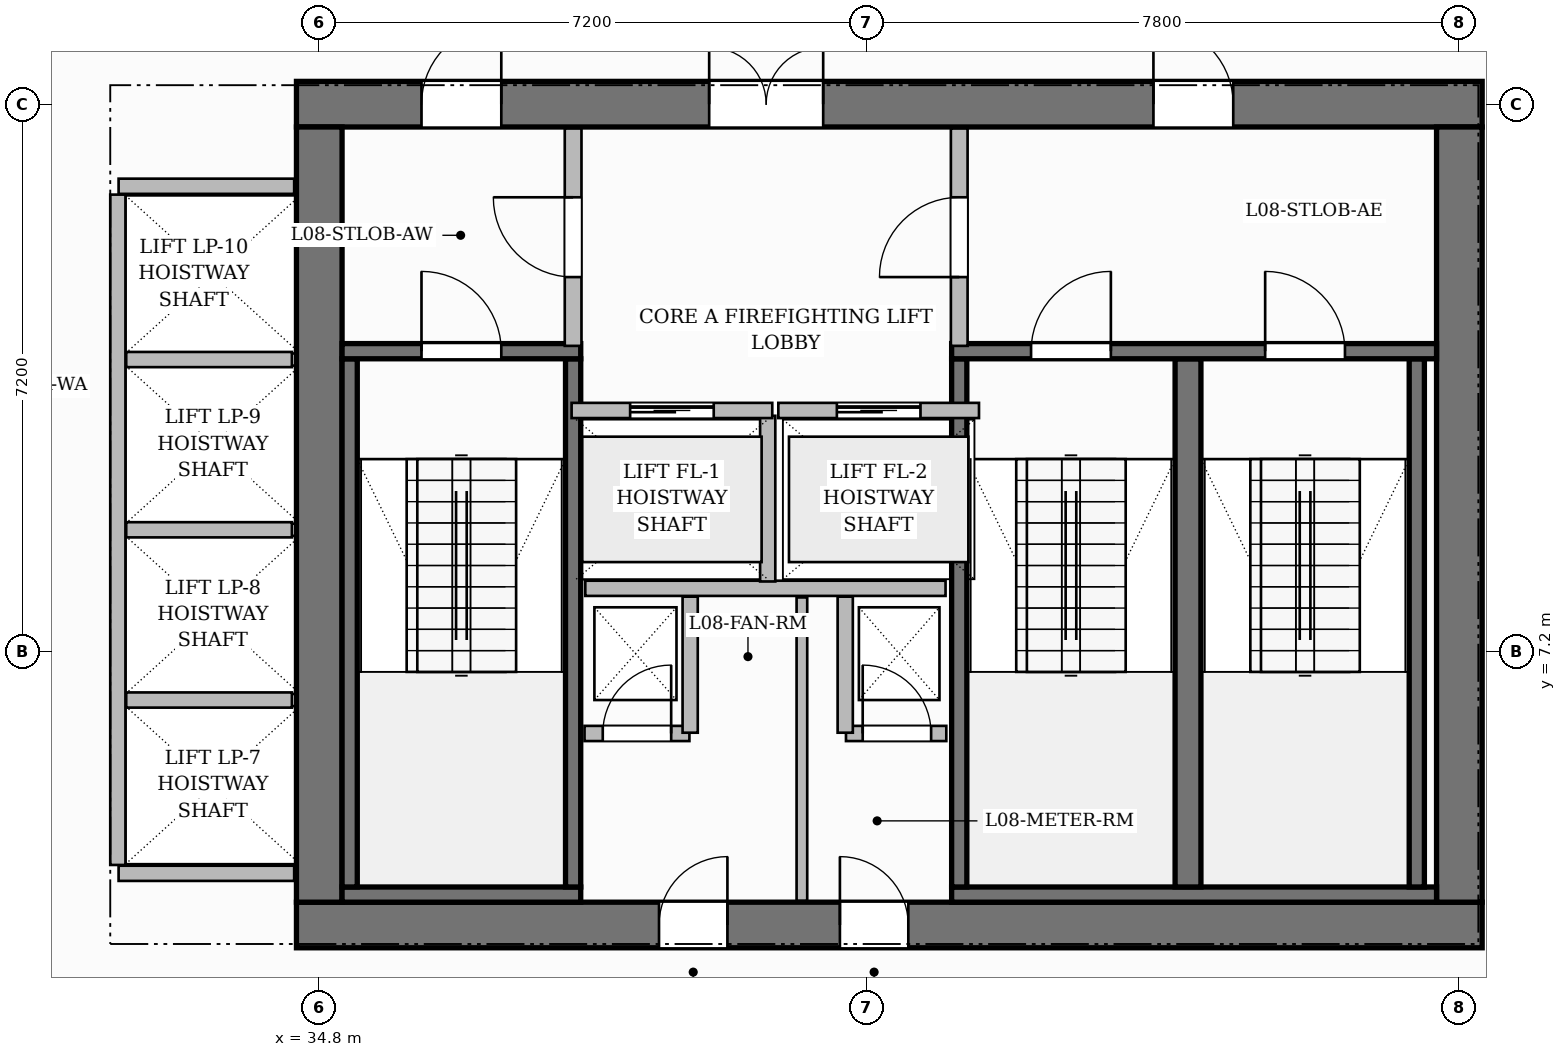
"""IFC4 building model, lengths in metres.
Left out: names, types, materials, properties, quantities, classifications, styles, units other than length and angle.
Written with IfcOpenShell. Run it as: python <this file> out.ifc"""

import sys

from ifc_helpers import new_model, si_unit, direction, frame, frame_2d, origin, place, context, subcontext, project, spatial, rectangle, extrude, source, transform, mapped, element, fill, save


model = new_model("IFC4")
c1 = context("Model", 3, precision=1e-05, world=origin(), true_north=direction((0.0, 1.0)))
c2 = subcontext(c1, "Body", "Model", "MODEL_VIEW")
j1 = project(units=[si_unit("LENGTHUNIT", "METRE"), si_unit("PLANEANGLEUNIT", "RADIAN")], contexts=[c1])
p1 = place(None, origin())
s1 = spatial("IfcSite", under=j1, at=p1, CompositionType="ELEMENT")
p2 = place(p1, origin())
s2 = spatial("IfcBuilding", under=s1, at=p2, CompositionType="ELEMENT")
p3 = place(p2, frame((0.0, 0.0, 39.8)))
s3 = spatial("IfcBuildingStorey", under=s2, at=p3, CompositionType="ELEMENT", Elevation=39.8)
p4 = place(p3, frame((34.5, 3.6, 0.0), z_axis=(0.0, 0.0, 1.0), x_axis=(1.0, 0.0, 0.0)))
e1 = element("IfcWall", 1, at=p4, inside=s3, PredefinedType="SHEAR", context=c2, shape_type="SweptSolid", body=[
    extrude(rectangle(XDim=15.6, YDim=0.6, at=frame_2d((7.8, 0.0))), origin(), (0.0, 0.0, 1.0), 3.7),
])
p5 = place(p4, frame((4.77, 0.0, 0.0)))
e2 = element("IfcOpeningElement", 2, at=p5, cuts=e1, PredefinedType="OPENING", context=c2, shape_type="SweptSolid", body=[
    extrude(rectangle(XDim=0.9, YDim=2.1, at=frame_2d((0.45, 1.05))), frame((0.0, 0.31, 0.0), z_axis=(0.0, -1.0, 0.0), x_axis=(1.0, 0.0, 0.0)), (0.0, 0.0, 1.0), 0.62),
])
p6 = place(p4, frame((7.15, 0.0, 0.0)))
e3 = element("IfcOpeningElement", 3, at=p6, cuts=e1, PredefinedType="OPENING", context=c2, shape_type="SweptSolid", body=[
    extrude(rectangle(XDim=0.9, YDim=2.1, at=frame_2d((0.45, 1.05))), frame((0.0, 0.31, 0.0), z_axis=(0.0, -1.0, 0.0), x_axis=(1.0, 0.0, 0.0)), (0.0, 0.0, 1.0), 0.62),
])
p7 = place(p3, frame((34.5, 14.4, 0.0), z_axis=(0.0, 0.0, 1.0), x_axis=(1.0, 0.0, 0.0)))
e4 = element("IfcWall", 4, at=p7, inside=s3, PredefinedType="SHEAR", context=c2, shape_type="SweptSolid", body=[
    extrude(rectangle(XDim=15.6, YDim=0.6, at=frame_2d((7.8, 0.0))), origin(), (0.0, 0.0, 1.0), 3.7),
])
p8 = place(p7, frame((5.43, 0.0, 0.0)))
e5 = element("IfcOpeningElement", 5, at=p8, cuts=e4, PredefinedType="OPENING", context=c2, shape_type="SweptSolid", body=[
    extrude(rectangle(XDim=1.5, YDim=2.2, at=frame_2d((0.75, 1.1))), frame((0.0, 0.31, 0.0), z_axis=(0.0, -1.0, 0.0), x_axis=(1.0, 0.0, 0.0)), (0.0, 0.0, 1.0), 0.62),
])
p9 = place(p7, frame((1.645, 0.0, 0.0)))
e6 = element("IfcOpeningElement", 6, at=p9, cuts=e4, PredefinedType="OPENING", context=c2, shape_type="SweptSolid", body=[
    extrude(rectangle(XDim=1.05, YDim=2.15, at=frame_2d((0.525, 1.075))), frame((0.0, 0.31, 0.0), z_axis=(0.0, -1.0, 0.0), x_axis=(1.0, 0.0, 0.0)), (0.0, 0.0, 1.0), 0.62),
])
p10 = place(p7, frame((11.275, 0.0, 0.0)))
e7 = element("IfcOpeningElement", 7, at=p10, cuts=e4, PredefinedType="OPENING", context=c2, shape_type="SweptSolid", body=[
    extrude(rectangle(XDim=1.05, YDim=2.15, at=frame_2d((0.525, 1.075))), frame((0.0, 0.31, 0.0), z_axis=(0.0, -1.0, 0.0), x_axis=(1.0, 0.0, 0.0)), (0.0, 0.0, 1.0), 0.62),
])
for number, where, z_axis, x_axis in (
    (8, (34.8, 3.9, 0.0), (0.0, 0.0, 1.0), (0.0, 1.0, 0.0)),
    (9, (49.8, 3.9, 0.0), (0.0, 0.0, 1.0), (0.0, 1.0, 0.0)),
):
    element("IfcWall", number, at=place(p3, frame(where, z_axis=z_axis, x_axis=x_axis)), inside=s3, PredefinedType="SHEAR", context=c2, shape_type="SweptSolid", body=[
        extrude(rectangle(XDim=10.2, YDim=0.6, at=frame_2d((5.1, 0.0))), origin(), (0.0, 0.0, 1.0), 3.7),
    ])
p11 = place(p3, frame((35.1, 4.0, 0.0), z_axis=(0.0, 0.0, 1.0), x_axis=(1.0, 0.0, 0.0)))
e10 = element("IfcWall", 10, at=p11, inside=s3, PredefinedType="SHEAR", context=c2, shape_type="SweptSolid", body=[
    extrude(rectangle(XDim=3.14, YDim=0.2, at=frame_2d((1.57, 0.0))), origin(), (0.0, 0.0, 1.0), 3.7),
])
for number, where, z_axis, x_axis in (
    (11, (35.2, 4.1, 0.0), (0.0, 0.0, 1.0), (0.0, 1.0, 0.0)),
    (12, (38.14, 4.1, 0.0), (0.0, 0.0, 1.0), (0.0, 1.0, 0.0)),
):
    element("IfcWall", number, at=place(p3, frame(where, z_axis=z_axis, x_axis=x_axis)), inside=s3, PredefinedType="SHEAR", context=c2, shape_type="SweptSolid", body=[
        extrude(rectangle(XDim=6.95, YDim=0.2, at=frame_2d((3.475, 0.0))), origin(), (0.0, 0.0, 1.0), 3.7),
    ])
p12 = place(p3, frame((35.1, 11.15, 0.0), z_axis=(0.0, 0.0, 1.0), x_axis=(1.0, 0.0, 0.0)))
e13 = element("IfcWall", 13, at=p12, inside=s3, PredefinedType="SHEAR", context=c2, shape_type="SweptSolid", body=[
    extrude(rectangle(XDim=3.14, YDim=0.2, at=frame_2d((1.57, 0.0))), origin(), (0.0, 0.0, 1.0), 3.7),
])
p13 = place(p12, frame((1.045, 0.0, 0.0)))
e14 = element("IfcOpeningElement", 14, at=p13, cuts=e13, PredefinedType="OPENING", context=c2, shape_type="SweptSolid", body=[
    extrude(rectangle(XDim=1.05, YDim=2.2, at=frame_2d((0.525, 1.1))), frame((0.0, 0.11, 0.0), z_axis=(0.0, -1.0, 0.0), x_axis=(1.0, 0.0, 0.0)), (0.0, 0.0, 1.0), 0.22),
])
p14 = place(p3, frame((43.12, 4.0, 0.0), z_axis=(0.0, 0.0, 1.0), x_axis=(1.0, 0.0, 0.0)))
e15 = element("IfcWall", 15, at=p14, inside=s3, PredefinedType="SHEAR", context=c2, shape_type="SweptSolid", body=[
    extrude(rectangle(XDim=6.38, YDim=0.2, at=frame_2d((3.19, 0.0))), origin(), (0.0, 0.0, 1.0), 3.7),
])
p15 = place(p3, frame((43.22, 4.1, 0.0), z_axis=(0.0, 0.0, 1.0), x_axis=(0.0, 1.0, 0.0)))
e16 = element("IfcWall", 16, at=p15, inside=s3, PredefinedType="SHEAR", context=c2, shape_type="SweptSolid", body=[
    extrude(rectangle(XDim=6.95, YDim=0.2, at=frame_2d((3.475, 0.0))), origin(), (0.0, 0.0, 1.0), 3.7),
])
p16 = place(p3, frame((46.23, 4.1, 0.0), z_axis=(0.0, 0.0, 1.0), x_axis=(0.0, 1.0, 0.0)))
e17 = element("IfcWall", 17, at=p16, inside=s3, PredefinedType="SHEAR", context=c2, shape_type="SweptSolid", body=[
    extrude(rectangle(XDim=6.95, YDim=0.34, at=frame_2d((3.475, 0.0))), origin(), (0.0, 0.0, 1.0), 3.7),
])
p17 = place(p3, frame((49.24, 4.1, 0.0), z_axis=(0.0, 0.0, 1.0), x_axis=(0.0, 1.0, 0.0)))
e18 = element("IfcWall", 18, at=p17, inside=s3, PredefinedType="SHEAR", context=c2, shape_type="SweptSolid", body=[
    extrude(rectangle(XDim=6.95, YDim=0.2, at=frame_2d((3.475, 0.0))), origin(), (0.0, 0.0, 1.0), 3.7),
])
p18 = place(p3, frame((43.12, 11.15, 0.0), z_axis=(0.0, 0.0, 1.0), x_axis=(1.0, 0.0, 0.0)))
e19 = element("IfcWall", 19, at=p18, inside=s3, PredefinedType="SHEAR", context=c2, shape_type="SweptSolid", body=[
    extrude(rectangle(XDim=6.38, YDim=0.2, at=frame_2d((3.19, 0.0))), origin(), (0.0, 0.0, 1.0), 3.7),
])
p19 = place(p18, frame((1.045, 0.0, 0.0)))
e20 = element("IfcOpeningElement", 20, at=p19, cuts=e19, PredefinedType="OPENING", context=c2, shape_type="SweptSolid", body=[
    extrude(rectangle(XDim=1.05, YDim=2.2, at=frame_2d((0.525, 1.1))), frame((0.0, 0.11, 0.0), z_axis=(0.0, -1.0, 0.0), x_axis=(1.0, 0.0, 0.0)), (0.0, 0.0, 1.0), 0.22),
])
p20 = place(p18, frame((4.125, 0.0, 0.0)))
e21 = element("IfcOpeningElement", 21, at=p20, cuts=e19, PredefinedType="OPENING", context=c2, shape_type="SweptSolid", body=[
    extrude(rectangle(XDim=1.05, YDim=2.2, at=frame_2d((0.525, 1.1))), frame((0.0, 0.11, 0.0), z_axis=(0.0, -1.0, 0.0), x_axis=(1.0, 0.0, 0.0)), (0.0, 0.0, 1.0), 0.22),
])
p21 = place(p3, frame((38.3, 8.03, 0.0), z_axis=(0.0, 0.0, 1.0), x_axis=(1.0, 0.0, 0.0)))
e22 = element("IfcWall", 22, at=p21, inside=s3, PredefinedType="PARTITIONING", context=c2, shape_type="SweptSolid", body=[
    extrude(rectangle(XDim=4.74, YDim=0.2, at=frame_2d((2.37, 0.0))), origin(), (0.0, 0.0, 1.0), 3.45),
])
p22 = place(p3, frame((40.7, 8.12, 0.0), z_axis=(0.0, 0.0, 1.0), x_axis=(0.0, 1.0, 0.0)))
e23 = element("IfcWall", 23, at=p22, inside=s3, PredefinedType="PARTITIONING", context=c2, shape_type="SweptSolid", body=[
    extrude(rectangle(XDim=2.18, YDim=0.2, at=frame_2d((1.09, 0.0))), origin(), (0.0, 0.0, 1.0), 3.45),
])
p23 = place(p3, frame((38.14, 11.22, 0.0), z_axis=(0.0, 0.0, 1.0), x_axis=(0.0, 1.0, 0.0)))
e24 = element("IfcWall", 24, at=p23, inside=s3, PredefinedType="PARTITIONING", context=c2, shape_type="SweptSolid", body=[
    extrude(rectangle(XDim=2.86, YDim=0.22, at=frame_2d((1.43, 0.0))), origin(), (0.0, 0.0, 1.0), 3.45),
])
p24 = place(p23, frame((0.905, 0.0, 0.0)))
e25 = element("IfcOpeningElement", 25, at=p24, cuts=e24, PredefinedType="OPENING", context=c2, shape_type="SweptSolid", body=[
    extrude(rectangle(XDim=1.05, YDim=2.15, at=frame_2d((0.525, 1.075))), frame((0.0, 0.12, 0.0), z_axis=(0.0, -1.0, 0.0), x_axis=(1.0, 0.0, 0.0)), (0.0, 0.0, 1.0), 0.24),
])
p25 = place(p3, frame((43.22, 11.22, 0.0), z_axis=(0.0, 0.0, 1.0), x_axis=(0.0, 1.0, 0.0)))
e26 = element("IfcWall", 26, at=p25, inside=s3, PredefinedType="PARTITIONING", context=c2, shape_type="SweptSolid", body=[
    extrude(rectangle(XDim=2.86, YDim=0.22, at=frame_2d((1.43, 0.0))), origin(), (0.0, 0.0, 1.0), 3.45),
])
p26 = place(p25, frame((0.905, 0.0, 0.0)))
e27 = element("IfcOpeningElement", 27, at=p26, cuts=e26, PredefinedType="OPENING", context=c2, shape_type="SweptSolid", body=[
    extrude(rectangle(XDim=1.05, YDim=2.15, at=frame_2d((0.525, 1.075))), frame((0.0, 0.12, 0.0), z_axis=(0.0, -1.0, 0.0), x_axis=(1.0, 0.0, 0.0)), (0.0, 0.0, 1.0), 0.24),
])
p27 = place(p3, frame((38.29, 6.12, 0.0), z_axis=(0.0, 0.0, 1.0), x_axis=(1.0, 0.0, 0.0)))
e28 = element("IfcWall", 28, at=p27, inside=s3, PredefinedType="PARTITIONING", context=c2, shape_type="SweptSolid", body=[
    extrude(rectangle(XDim=1.38, YDim=0.2, at=frame_2d((0.69, 0.0))), origin(), (0.0, 0.0, 1.0), 3.45),
])
p28 = place(p27, frame((0.24, 0.0, 0.0)))
e29 = element("IfcOpeningElement", 29, at=p28, cuts=e28, PredefinedType="OPENING", context=c2, shape_type="SweptSolid", body=[
    extrude(rectangle(XDim=0.9, YDim=2.1, at=frame_2d((0.45, 1.05))), frame((0.0, 0.11, 0.0), z_axis=(0.0, -1.0, 0.0), x_axis=(1.0, 0.0, 0.0)), (0.0, 0.0, 1.0), 0.22),
])
p29 = place(p3, frame((39.68, 6.13, 0.0), z_axis=(0.0, 0.0, 1.0), x_axis=(0.0, 1.0, 0.0)))
e30 = element("IfcWall", 30, at=p29, inside=s3, PredefinedType="PARTITIONING", context=c2, shape_type="SweptSolid", body=[
    extrude(rectangle(XDim=1.79, YDim=0.2, at=frame_2d((0.895, 0.0))), origin(), (0.0, 0.0, 1.0), 3.45),
])
p30 = place(p3, frame((41.73, 6.12, 0.0), z_axis=(0.0, 0.0, 1.0), x_axis=(1.0, 0.0, 0.0)))
e31 = element("IfcWall", 31, at=p30, inside=s3, PredefinedType="PARTITIONING", context=c2, shape_type="SweptSolid", body=[
    extrude(rectangle(XDim=1.32, YDim=0.2, at=frame_2d((0.66, 0.0))), origin(), (0.0, 0.0, 1.0), 3.45),
])
p31 = place(p30, frame((0.22, 0.0, 0.0)))
e32 = element("IfcOpeningElement", 32, at=p31, cuts=e31, PredefinedType="OPENING", context=c2, shape_type="SweptSolid", body=[
    extrude(rectangle(XDim=0.9, YDim=2.1, at=frame_2d((0.45, 1.05))), frame((0.0, 0.11, 0.0), z_axis=(0.0, -1.0, 0.0), x_axis=(1.0, 0.0, 0.0)), (0.0, 0.0, 1.0), 0.22),
])
p32 = place(p3, frame((41.72, 6.13, 0.0), z_axis=(0.0, 0.0, 1.0), x_axis=(0.0, 1.0, 0.0)))
e33 = element("IfcWall", 33, at=p32, inside=s3, PredefinedType="PARTITIONING", context=c2, shape_type="SweptSolid", body=[
    extrude(rectangle(XDim=1.79, YDim=0.2, at=frame_2d((0.895, 0.0))), origin(), (0.0, 0.0, 1.0), 3.45),
])
p33 = place(p3, frame((41.15, 3.92, 0.0), z_axis=(0.0, 0.0, 1.0), x_axis=(0.0, 1.0, 0.0)))
e34 = element("IfcWall", 34, at=p33, inside=s3, PredefinedType="PARTITIONING", context=c2, shape_type="SweptSolid", body=[
    extrude(rectangle(XDim=3.99, YDim=0.14, at=frame_2d((1.995, 0.0))), origin(), (0.0, 0.0, 1.0), 3.45),
])
for number, where, z_axis, x_axis in (
    (35, (32.16, 4.28, 0.0), (0.0, 0.0, 1.0), (1.0, 0.0, 0.0)),
    (36, (32.16, 13.32, 0.0), (0.0, 0.0, 1.0), (1.0, 0.0, 0.0)),
):
    element("IfcWall", number, at=place(p3, frame(where, z_axis=z_axis, x_axis=x_axis)), inside=s3, PredefinedType="PARTITIONING", context=c2, shape_type="SweptSolid", body=[
        extrude(rectangle(XDim=2.31, YDim=0.2, at=frame_2d((1.155, 0.0))), origin(), (0.0, 0.0, 1.0), 3.45),
    ])
p34 = place(p3, frame((32.15, 4.39, 0.0), z_axis=(0.0, 0.0, 1.0), x_axis=(0.0, 1.0, 0.0)))
e37 = element("IfcWall", 37, at=p34, inside=s3, PredefinedType="PARTITIONING", context=c2, shape_type="SweptSolid", body=[
    extrude(rectangle(XDim=8.82, YDim=0.2, at=frame_2d((4.41, 0.0))), origin(), (0.0, 0.0, 1.0), 3.45),
])
for number, where, z_axis, x_axis in (
    (38, (32.26, 6.56, 0.0), (0.0, 0.0, 1.0), (1.0, 0.0, 0.0)),
    (39, (32.26, 8.8, 0.0), (0.0, 0.0, 1.0), (1.0, 0.0, 0.0)),
    (40, (32.26, 11.04, 0.0), (0.0, 0.0, 1.0), (1.0, 0.0, 0.0)),
):
    element("IfcWall", number, at=place(p3, frame(where, z_axis=z_axis, x_axis=x_axis)), inside=s3, PredefinedType="PARTITIONING", context=c2, shape_type="SweptSolid", body=[
        extrude(rectangle(XDim=2.18, YDim=0.2, at=frame_2d((1.09, 0.0))), origin(), (0.0, 0.0, 1.0), 3.45),
    ])
p35 = place(p3, frame((38.12, 10.37, 0.0), z_axis=(0.0, 0.0, 1.0), x_axis=(1.0, 0.0, 0.0)))
e41 = element("IfcWall", 41, at=p35, inside=s3, PredefinedType="PARTITIONING", context=c2, shape_type="SweptSolid", body=[
    extrude(rectangle(XDim=2.64, YDim=0.2, at=frame_2d((1.32, 0.0))), origin(), (0.0, 0.0, 1.0), 3.45),
])
p36 = place(p35, frame((0.77, 0.0, 0.0)))
e42 = element("IfcOpeningElement", 42, at=p36, cuts=e41, PredefinedType="OPENING", context=c2, shape_type="SweptSolid", body=[
    extrude(rectangle(XDim=1.1, YDim=2.2, at=frame_2d((0.55, 1.1))), frame((0.0, 0.11, 0.0), z_axis=(0.0, -1.0, 0.0), x_axis=(1.0, 0.0, 0.0)), (0.0, 0.0, 1.0), 0.22),
])
p37 = place(p3, frame((40.84, 10.37, 0.0), z_axis=(0.0, 0.0, 1.0), x_axis=(1.0, 0.0, 0.0)))
e43 = element("IfcWall", 43, at=p37, inside=s3, PredefinedType="PARTITIONING", context=c2, shape_type="SweptSolid", body=[
    extrude(rectangle(XDim=2.64, YDim=0.2, at=frame_2d((1.32, 0.0))), origin(), (0.0, 0.0, 1.0), 3.45),
])
p38 = place(p37, frame((0.77, 0.0, 0.0)))
e44 = element("IfcOpeningElement", 44, at=p38, cuts=e43, PredefinedType="OPENING", context=c2, shape_type="SweptSolid", body=[
    extrude(rectangle(XDim=1.1, YDim=2.2, at=frame_2d((0.55, 1.1))), frame((0.0, 0.11, 0.0), z_axis=(0.0, -1.0, 0.0), x_axis=(1.0, 0.0, 0.0)), (0.0, 0.0, 1.0), 0.22),
])
m1 = source(origin(), c2, "Body", "SweptSolid", [
    extrude(rectangle(XDim=1.05, YDim=2.2, at=frame_2d((0.525, 1.1))), frame((0.0, 0.025, 0.0), z_axis=(0.0, -1.0, 0.0), x_axis=(1.0, 0.0, 0.0)), (0.0, 0.0, 1.0), 0.05),
])
p39 = place(p13, origin())
e45 = element("IfcDoor", 45, at=p39, inside=s3, OperationType="SINGLE_SWING_LEFT", PredefinedType="DOOR", context=c2, shape_type="MappedRepresentation", body=[
    mapped(m1, transform((0.0, 0.0, 0.0), scale=1.0)),
])
fill(e14, e45)
p40 = place(p19, origin())
e46 = element("IfcDoor", 46, at=p40, inside=s3, OperationType="SINGLE_SWING_RIGHT", PredefinedType="DOOR", context=c2, shape_type="MappedRepresentation", body=[
    mapped(m1, transform((0.0, 0.0, 0.0), scale=1.0)),
])
fill(e20, e46)
p41 = place(p20, origin())
e47 = element("IfcDoor", 47, at=p41, inside=s3, OperationType="SINGLE_SWING_LEFT", PredefinedType="DOOR", context=c2, shape_type="MappedRepresentation", body=[
    mapped(m1, transform((0.0, 0.0, 0.0), scale=1.0)),
])
fill(e21, e47)
m2 = source(origin(), c2, "Body", "SweptSolid", [
    extrude(rectangle(XDim=1.05, YDim=2.15, at=frame_2d((0.525, 1.075))), frame((0.0, 0.025, 0.0), z_axis=(0.0, -1.0, 0.0), x_axis=(1.0, 0.0, 0.0)), (0.0, 0.0, 1.0), 0.05),
])
p42 = place(p24, origin())
e48 = element("IfcDoor", 48, at=p42, inside=s3, OperationType="SINGLE_SWING_RIGHT", PredefinedType="DOOR", context=c2, shape_type="MappedRepresentation", body=[
    mapped(m2, transform((0.0, 0.0, 0.0), scale=1.0)),
])
fill(e25, e48)
p43 = place(p26, origin())
e49 = element("IfcDoor", 49, at=p43, inside=s3, OperationType="SINGLE_SWING_LEFT", PredefinedType="DOOR", context=c2, shape_type="MappedRepresentation", body=[
    mapped(m2, transform((0.0, 0.0, 0.0), scale=1.0)),
])
fill(e27, e49)
m3 = source(origin(), c2, "Body", "SweptSolid", [
    extrude(rectangle(XDim=1.5, YDim=2.2, at=frame_2d((0.75, 1.1))), frame((0.0, 0.025, 0.0), z_axis=(0.0, -1.0, 0.0), x_axis=(1.0, 0.0, 0.0)), (0.0, 0.0, 1.0), 0.05),
])
p44 = place(p8, origin())
e50 = element("IfcDoor", 50, at=p44, inside=s3, OperationType="DOUBLE_DOOR_SINGLE_SWING", PredefinedType="DOOR", context=c2, shape_type="MappedRepresentation", body=[
    mapped(m3, transform((0.0, 0.0, 0.0), scale=1.0)),
])
fill(e5, e50)
p45 = place(p9, origin())
e51 = element("IfcDoor", 51, at=p45, inside=s3, OperationType="SINGLE_SWING_RIGHT", PredefinedType="DOOR", context=c2, shape_type="MappedRepresentation", body=[
    mapped(m2, transform((0.0, 0.0, 0.0), scale=1.0)),
])
fill(e6, e51)
p46 = place(p10, origin())
e52 = element("IfcDoor", 52, at=p46, inside=s3, OperationType="SINGLE_SWING_LEFT", PredefinedType="DOOR", context=c2, shape_type="MappedRepresentation", body=[
    mapped(m2, transform((0.0, 0.0, 0.0), scale=1.0)),
])
fill(e7, e52)
m4 = source(origin(), c2, "Body", "SweptSolid", [
    extrude(rectangle(XDim=0.9, YDim=2.1, at=frame_2d((0.45, 1.05))), frame((0.0, 0.025, 0.0), z_axis=(0.0, -1.0, 0.0), x_axis=(1.0, 0.0, 0.0)), (0.0, 0.0, 1.0), 0.05),
])
p47 = place(p28, origin())
e53 = element("IfcDoor", 53, at=p47, inside=s3, OperationType="SINGLE_SWING_RIGHT", PredefinedType="DOOR", context=c2, shape_type="MappedRepresentation", body=[
    mapped(m4, transform((0.0, 0.0, 0.0), scale=1.0)),
])
fill(e29, e53)
p48 = place(p31, origin())
e54 = element("IfcDoor", 54, at=p48, inside=s3, OperationType="SINGLE_SWING_LEFT", PredefinedType="DOOR", context=c2, shape_type="MappedRepresentation", body=[
    mapped(m4, transform((0.0, 0.0, 0.0), scale=1.0)),
])
fill(e32, e54)
p49 = place(p5, origin())
e55 = element("IfcDoor", 55, at=p49, inside=s3, OperationType="SINGLE_SWING_RIGHT", PredefinedType="DOOR", context=c2, shape_type="MappedRepresentation", body=[
    mapped(m4, transform((0.0, 0.0, 0.0), scale=1.0)),
])
fill(e2, e55)
p50 = place(p6, origin())
e56 = element("IfcDoor", 56, at=p50, inside=s3, OperationType="SINGLE_SWING_LEFT", PredefinedType="DOOR", context=c2, shape_type="MappedRepresentation", body=[
    mapped(m4, transform((0.0, 0.0, 0.0), scale=1.0)),
])
fill(e3, e56)
m5 = source(origin(), c2, "Body", "SweptSolid", [
    extrude(rectangle(XDim=1.1, YDim=2.2, at=frame_2d((0.55, 1.1))), frame((0.0, 0.025, 0.0), z_axis=(0.0, -1.0, 0.0), x_axis=(1.0, 0.0, 0.0)), (0.0, 0.0, 1.0), 0.05),
])
p51 = place(p36, origin())
e57 = element("IfcDoor", 57, at=p51, inside=s3, OperationType="SLIDING_TO_LEFT", PredefinedType="DOOR", context=c2, shape_type="MappedRepresentation", body=[
    mapped(m5, transform((0.0, 0.0, 0.0), scale=1.0)),
])
fill(e42, e57)
p52 = place(p38, origin())
e58 = element("IfcDoor", 58, at=p52, inside=s3, OperationType="SLIDING_TO_LEFT", PredefinedType="DOOR", context=c2, shape_type="MappedRepresentation", body=[
    mapped(m5, transform((0.0, 0.0, 0.0), scale=1.0)),
])
fill(e44, e58)
save(model, sys.argv[1])
